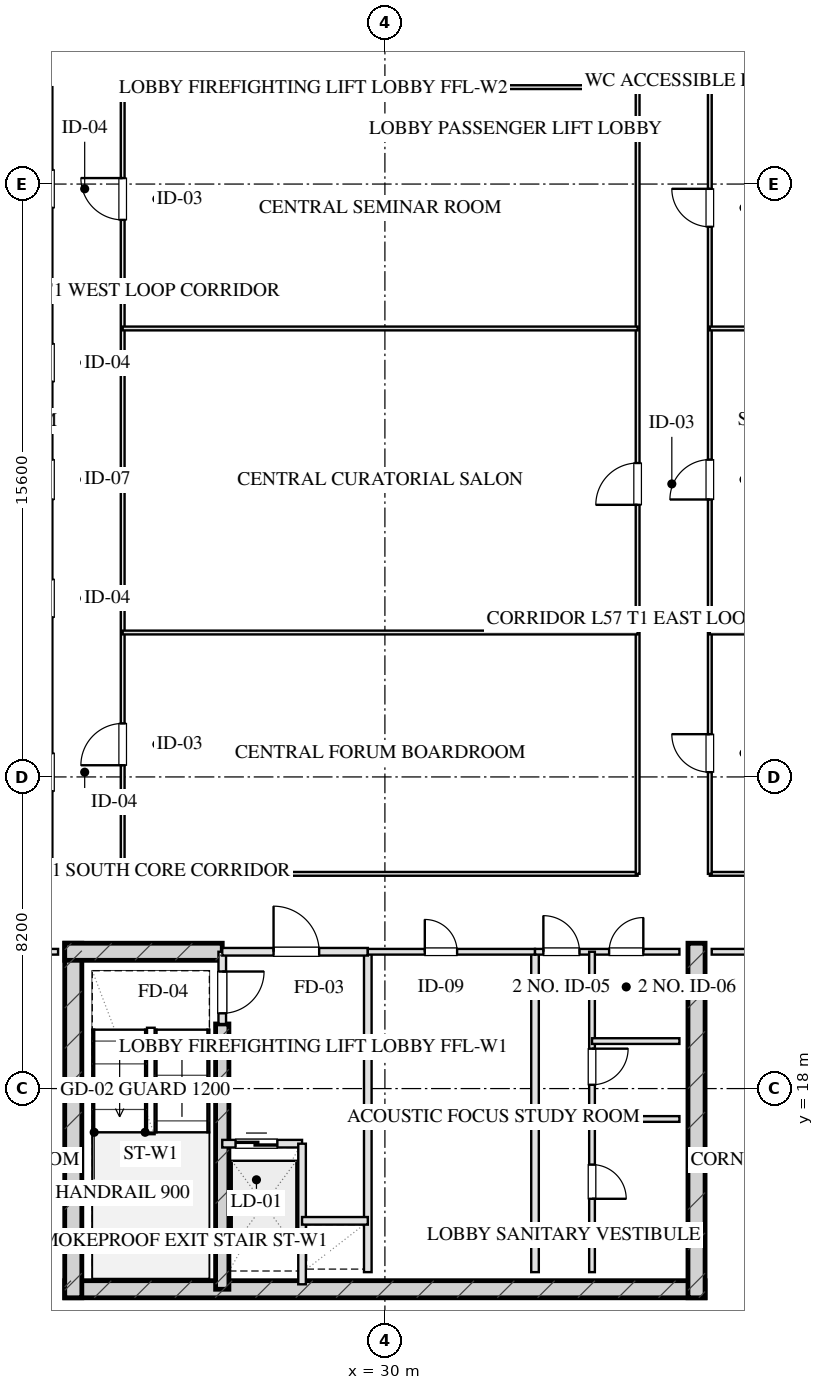
"""IFC4 building model, lengths in metres.
Left out: names, types, materials, properties, quantities, classifications, styles, units other than length and angle.
Written with IfcOpenShell. Run it as: python <this file> out.ifc"""

import sys

from ifc_helpers import new_model, si_unit, direction, frame, frame_2d, origin, place, context, subcontext, project, spatial, rectangle, extrude, element, fill, save


model = new_model("IFC4")
c1 = context("Model", 3, precision=1e-05, world=origin(), true_north=direction((0.0, 1.0)))
c2 = subcontext(c1, "Body", "Model", "MODEL_VIEW")
j1 = project(units=[si_unit("LENGTHUNIT", "METRE"), si_unit("PLANEANGLEUNIT", "RADIAN")], contexts=[c1])
p1 = place(None, origin())
s1 = spatial("IfcSite", under=j1, at=p1, CompositionType="ELEMENT")
p2 = place(p1, origin())
s2 = spatial("IfcBuilding", under=s1, at=p2, CompositionType="ELEMENT")
p3 = place(p2, frame((0.0, 0.0, 212.75)))
s3 = spatial("IfcBuildingStorey", under=s2, at=p3, CompositionType="ELEMENT", Elevation=212.75)
p4 = place(p3, frame((21.575, 12.72, 0.0), z_axis=(0.0, 0.0, 1.0), x_axis=(1.0, 0.0, 0.0)))
e1 = element("IfcWall", 1, at=p4, inside=s3, PredefinedType="SHEAR", context=c2, shape_type="SweptSolid", body=[
    extrude(rectangle(XDim=16.85, YDim=0.45, at=frame_2d((8.425, 0.0))), origin(), (0.0, 0.0, 1.0), 3.45),
])
for number, where, z_axis, x_axis in (
    (2, (21.8, 21.825, 0.0), (0.0, 0.0, 1.0), (0.0, -1.0, 0.0)),
    (3, (38.2, 21.825, 0.0), (0.0, 0.0, 1.0), (0.0, -1.0, 0.0)),
):
    element("IfcWall", number, at=place(p3, frame(where, z_axis=z_axis, x_axis=x_axis)), inside=s3, PredefinedType="SHEAR", context=c2, shape_type="SweptSolid", body=[
        extrude(rectangle(XDim=9.33, YDim=0.45, at=frame_2d((4.665, 0.0))), origin(), (0.0, 0.0, 1.0), 3.45),
    ])
p5 = place(p3, frame((25.72, 19.7, 0.0), z_axis=(0.0, 0.0, 1.0), x_axis=(0.0, -1.0, 0.0)))
e4 = element("IfcWall", 4, at=p5, inside=s3, PredefinedType="SHEAR", context=c2, shape_type="SweptSolid", body=[
    extrude(rectangle(XDim=6.98, YDim=0.35, at=frame_2d((3.49, 0.0))), origin(), (0.0, 0.0, 1.0), 3.45),
])
p6 = place(p3, frame((21.575, 21.6, 0.0), z_axis=(0.0, 0.0, 1.0), x_axis=(1.0, 0.0, 0.0)))
e5 = element("IfcWall", 5, at=p6, inside=s3, PredefinedType="SHEAR", context=c2, shape_type="SweptSolid", body=[
    extrude(rectangle(XDim=4.145, YDim=0.45, at=frame_2d((2.073, 0.0))), origin(), (0.0, 0.0, 1.0), 3.45),
])
p7 = place(p3, frame((25.72, 21.6, 0.0), z_axis=(0.0, 0.0, 1.0), x_axis=(0.0, -1.0, 0.0)))
e6 = element("IfcWall", 6, at=p7, inside=s3, PredefinedType="PARTITIONING", context=c2, shape_type="SweptSolid", body=[
    extrude(rectangle(XDim=1.9, YDim=0.2, at=frame_2d((0.95, 0.0))), origin(), (0.0, 0.0, 1.0), 3.155),
])
p8 = place(p7, frame((0.52, 0.0, 0.0)))
e7 = element("IfcOpeningElement", 7, at=p8, cuts=e6, PredefinedType="OPENING", context=c2, shape_type="SweptSolid", body=[
    extrude(rectangle(XDim=1.1, YDim=2.05, at=frame_2d((0.55, 1.025))), frame((0.0, 0.11, 0.0), z_axis=(0.0, -1.0, 0.0), x_axis=(1.0, 0.0, 0.0)), (0.0, 0.0, 1.0), 0.22),
])
p9 = place(p3, frame((29.55, 21.6, 0.0), z_axis=(0.0, 0.0, 1.0), x_axis=(0.0, -1.0, 0.0)))
e8 = element("IfcWall", 8, at=p9, inside=s3, PredefinedType="PARTITIONING", context=c2, shape_type="SweptSolid", body=[
    extrude(rectangle(XDim=8.43, YDim=0.2, at=frame_2d((4.215, 0.0))), origin(), (0.0, 0.0, 1.0), 3.155),
])
p10 = place(p3, frame((25.72, 21.6, 0.0), z_axis=(0.0, 0.0, 1.0), x_axis=(1.0, 0.0, 0.0)))
e9 = element("IfcWall", 9, at=p10, inside=s3, PredefinedType="PARTITIONING", context=c2, shape_type="SweptSolid", body=[
    extrude(rectangle(XDim=3.83, YDim=0.2, at=frame_2d((1.915, 0.0))), origin(), (0.0, 0.0, 1.0), 3.155),
])
p11 = place(p10, frame((1.35, 0.0, 0.0)))
e10 = element("IfcOpeningElement", 10, at=p11, cuts=e9, PredefinedType="OPENING", context=c2, shape_type="SweptSolid", body=[
    extrude(rectangle(XDim=1.2, YDim=2.05, at=frame_2d((0.6, 1.025))), frame((0.0, 0.11, 0.0), z_axis=(0.0, -1.0, 0.0), x_axis=(1.0, 0.0, 0.0)), (0.0, 0.0, 1.0), 0.22),
])
p12 = place(p3, frame((25.72, 16.55, 0.0), z_axis=(0.0, 0.0, 1.0), x_axis=(1.0, 0.0, 0.0)))
e11 = element("IfcWall", 11, at=p12, inside=s3, PredefinedType="PARTITIONING", context=c2, shape_type="SweptSolid", body=[
    extrude(rectangle(XDim=2.1, YDim=0.2, at=frame_2d((1.05, 0.0))), origin(), (0.0, 0.0, 1.0), 3.155),
])
p13 = place(p12, frame((0.35, 0.0, 0.0)))
e12 = element("IfcOpeningElement", 12, at=p13, cuts=e11, PredefinedType="OPENING", context=c2, shape_type="SweptSolid", body=[
    extrude(rectangle(XDim=1.1, YDim=2.05, at=frame_2d((0.55, 1.025))), frame((0.0, 0.11, 0.0), z_axis=(0.0, -1.0, 0.0), x_axis=(1.0, 0.0, 0.0)), (0.0, 0.0, 1.0), 0.22),
])
p14 = place(p3, frame((27.82, 16.55, 0.0), z_axis=(0.0, 0.0, 1.0), x_axis=(0.0, -1.0, 0.0)))
e13 = element("IfcWall", 13, at=p14, inside=s3, PredefinedType="PARTITIONING", context=c2, shape_type="SweptSolid", body=[
    extrude(rectangle(XDim=3.7, YDim=0.2, at=frame_2d((1.85, 0.0))), origin(), (0.0, 0.0, 1.0), 3.155),
])
p15 = place(p3, frame((27.82, 14.52, 0.0), z_axis=(0.0, 0.0, 1.0), x_axis=(1.0, 0.0, 0.0)))
e14 = element("IfcWall", 14, at=p15, inside=s3, PredefinedType="PARTITIONING", context=c2, shape_type="SweptSolid", body=[
    extrude(rectangle(XDim=1.73, YDim=0.2, at=frame_2d((0.865, 0.0))), origin(), (0.0, 0.0, 1.0), 3.155),
])
p16 = place(p3, frame((33.95, 21.6, 0.0), z_axis=(0.0, 0.0, 1.0), x_axis=(0.0, -1.0, 0.0)))
e15 = element("IfcWall", 15, at=p16, inside=s3, PredefinedType="PARTITIONING", context=c2, shape_type="SweptSolid", body=[
    extrude(rectangle(XDim=8.43, YDim=0.2, at=frame_2d((4.215, 0.0))), origin(), (0.0, 0.0, 1.0), 3.155),
])
p17 = place(p3, frame((29.55, 21.6, 0.0), z_axis=(0.0, 0.0, 1.0), x_axis=(1.0, 0.0, 0.0)))
e16 = element("IfcWall", 16, at=p17, inside=s3, PredefinedType="PARTITIONING", context=c2, shape_type="SweptSolid", body=[
    extrude(rectangle(XDim=4.4, YDim=0.15, at=frame_2d((2.2, 0.0))), origin(), (0.0, 0.0, 1.0), 3.155),
])
p18 = place(p17, frame((1.5, 0.0, 0.0)))
e17 = element("IfcOpeningElement", 17, at=p18, cuts=e16, PredefinedType="OPENING", context=c2, shape_type="SweptSolid", body=[
    extrude(rectangle(XDim=0.85, YDim=2.05, at=frame_2d((0.425, 1.025))), frame((0.0, 0.085, 0.0), z_axis=(0.0, -1.0, 0.0), x_axis=(1.0, 0.0, 0.0)), (0.0, 0.0, 1.0), 0.17),
])
p19 = place(p3, frame((29.55, 17.3, 0.0), z_axis=(0.0, 0.0, 1.0), x_axis=(1.0, 0.0, 0.0)))
e18 = element("IfcWall", 18, at=p19, inside=s3, PredefinedType="PARTITIONING", context=c2, shape_type="SweptSolid", body=[
    extrude(rectangle(XDim=4.4, YDim=0.15, at=frame_2d((2.2, 0.0))), origin(), (0.0, 0.0, 1.0), 3.155),
])
p20 = place(p3, frame((33.95, 21.6, 0.0), z_axis=(0.0, 0.0, 1.0), x_axis=(1.0, 0.0, 0.0)))
e19 = element("IfcWall", 19, at=p20, inside=s3, PredefinedType="PARTITIONING", context=c2, shape_type="SweptSolid", body=[
    extrude(rectangle(XDim=3.8, YDim=0.15, at=frame_2d((1.9, 0.0))), origin(), (0.0, 0.0, 1.0), 3.155),
])
p21 = place(p20, frame((0.22, 0.0, 0.0)))
e20 = element("IfcOpeningElement", 20, at=p21, cuts=e19, PredefinedType="OPENING", context=c2, shape_type="SweptSolid", body=[
    extrude(rectangle(XDim=0.95, YDim=2.05, at=frame_2d((0.475, 1.025))), frame((0.0, 0.085, 0.0), z_axis=(0.0, -1.0, 0.0), x_axis=(1.0, 0.0, 0.0)), (0.0, 0.0, 1.0), 0.17),
])
p22 = place(p20, frame((1.95, 0.0, 0.0)))
e21 = element("IfcOpeningElement", 21, at=p22, cuts=e19, PredefinedType="OPENING", context=c2, shape_type="SweptSolid", body=[
    extrude(rectangle(XDim=0.9, YDim=2.05, at=frame_2d((0.45, 1.025))), frame((0.0, 0.085, 0.0), z_axis=(0.0, -1.0, 0.0), x_axis=(1.0, 0.0, 0.0)), (0.0, 0.0, 1.0), 0.17),
])
p23 = place(p3, frame((35.45, 21.6, 0.0), z_axis=(0.0, 0.0, 1.0), x_axis=(0.0, -1.0, 0.0)))
e22 = element("IfcWall", 22, at=p23, inside=s3, PredefinedType="PARTITIONING", context=c2, shape_type="SweptSolid", body=[
    extrude(rectangle(XDim=8.43, YDim=0.15, at=frame_2d((4.215, 0.0))), origin(), (0.0, 0.0, 1.0), 2.795),
])
p24 = place(p23, frame((2.55, 0.0, 0.0)))
e23 = element("IfcOpeningElement", 23, at=p24, cuts=e22, PredefinedType="OPENING", context=c2, shape_type="SweptSolid", body=[
    extrude(rectangle(XDim=0.95, YDim=2.05, at=frame_2d((0.475, 1.025))), frame((0.0, 0.085, 0.0), z_axis=(0.0, -1.0, 0.0), x_axis=(1.0, 0.0, 0.0)), (0.0, 0.0, 1.0), 0.17),
])
p25 = place(p23, frame((5.6, 0.0, 0.0)))
e24 = element("IfcOpeningElement", 24, at=p25, cuts=e22, PredefinedType="OPENING", context=c2, shape_type="SweptSolid", body=[
    extrude(rectangle(XDim=0.9, YDim=2.05, at=frame_2d((0.45, 1.025))), frame((0.0, 0.085, 0.0), z_axis=(0.0, -1.0, 0.0), x_axis=(1.0, 0.0, 0.0)), (0.0, 0.0, 1.0), 0.17),
])
for number, where, z_axis, x_axis in (
    (25, (35.45, 17.2, 0.0), (0.0, 0.0, 1.0), (1.0, 0.0, 0.0)),
    (26, (35.45, 19.25, 0.0), (0.0, 0.0, 1.0), (1.0, 0.0, 0.0)),
):
    element("IfcWall", number, at=place(p3, frame(where, z_axis=z_axis, x_axis=x_axis)), inside=s3, PredefinedType="PARTITIONING", context=c2, shape_type="SweptSolid", body=[
        extrude(rectangle(XDim=2.3, YDim=0.15, at=frame_2d((1.15, 0.0))), origin(), (0.0, 0.0, 1.0), 3.155),
    ])
p26 = place(p3, frame((13.2, 21.6, 0.0), z_axis=(0.0, 0.0, 1.0), x_axis=(1.0, 0.0, 0.0)))
e27 = element("IfcWall", 27, at=p26, inside=s3, PredefinedType="PARTITIONING", context=c2, shape_type="SweptSolid", body=[
    extrude(rectangle(XDim=8.2, YDim=0.15, at=frame_2d((4.1, 0.0))), origin(), (0.0, 0.0, 1.0), 3.155),
])
p27 = place(p26, frame((3.444, 0.0, 0.0)))
e28 = element("IfcOpeningElement", 28, at=p27, cuts=e27, PredefinedType="OPENING", context=c2, shape_type="SweptSolid", body=[
    extrude(rectangle(XDim=1.0, YDim=2.05, at=frame_2d((0.5, 1.025))), frame((0.0, 0.085, 0.0), z_axis=(0.0, -1.0, 0.0), x_axis=(1.0, 0.0, 0.0)), (0.0, 0.0, 1.0), 0.17),
])
p28 = place(p3, frame((38.6, 21.6, 0.0), z_axis=(0.0, 0.0, 1.0), x_axis=(1.0, 0.0, 0.0)))
e29 = element("IfcWall", 29, at=p28, inside=s3, PredefinedType="PARTITIONING", context=c2, shape_type="SweptSolid", body=[
    extrude(rectangle(XDim=8.2, YDim=0.15, at=frame_2d((4.1, 0.0))), origin(), (0.0, 0.0, 1.0), 3.155),
])
p29 = place(p28, frame((3.444, 0.0, 0.0)))
e30 = element("IfcOpeningElement", 30, at=p29, cuts=e29, PredefinedType="OPENING", context=c2, shape_type="SweptSolid", body=[
    extrude(rectangle(XDim=1.0, YDim=2.05, at=frame_2d((0.5, 1.025))), frame((0.0, 0.085, 0.0), z_axis=(0.0, -1.0, 0.0), x_axis=(1.0, 0.0, 0.0)), (0.0, 0.0, 1.0), 0.17),
])
p30 = place(p3, frame((23.1, 23.65, 0.0), z_axis=(0.0, 0.0, 1.0), x_axis=(1.0, 0.0, 0.0)))
e31 = element("IfcWall", 31, at=p30, inside=s3, PredefinedType="MOVABLE", context=c2, shape_type="SweptSolid", body=[
    extrude(rectangle(XDim=13.55, YDim=0.1, at=frame_2d((6.775, 0.0))), origin(), (0.0, 0.0, 1.0), 3.155),
])
p31 = place(p3, frame((38.55, 23.65, 0.0), z_axis=(0.0, 0.0, 1.0), x_axis=(1.0, 0.0, 0.0)))
e32 = element("IfcWall", 32, at=p31, inside=s3, PredefinedType="MOVABLE", context=c2, shape_type="SweptSolid", body=[
    extrude(rectangle(XDim=8.25, YDim=0.1, at=frame_2d((4.125, 0.0))), origin(), (0.0, 0.0, 1.0), 3.155),
])
p32 = place(p3, frame((23.1, 44.35, 0.0), z_axis=(0.0, 0.0, 1.0), x_axis=(1.0, 0.0, 0.0)))
e33 = element("IfcWall", 33, at=p32, inside=s3, PredefinedType="MOVABLE", context=c2, shape_type="SweptSolid", body=[
    extrude(rectangle(XDim=13.55, YDim=0.1, at=frame_2d((6.775, 0.0))), origin(), (0.0, 0.0, 1.0), 3.155),
])
p33 = place(p3, frame((38.55, 44.35, 0.0), z_axis=(0.0, 0.0, 1.0), x_axis=(1.0, 0.0, 0.0)))
e34 = element("IfcWall", 34, at=p33, inside=s3, PredefinedType="MOVABLE", context=c2, shape_type="SweptSolid", body=[
    extrude(rectangle(XDim=8.25, YDim=0.1, at=frame_2d((4.125, 0.0))), origin(), (0.0, 0.0, 1.0), 3.155),
])
p34 = place(p3, frame((23.1, 23.65, 0.0), z_axis=(0.0, 0.0, 1.0), x_axis=(0.0, 1.0, 0.0)))
e35 = element("IfcWall", 35, at=p34, inside=s3, PredefinedType="MOVABLE", context=c2, shape_type="SweptSolid", body=[
    extrude(rectangle(XDim=20.7, YDim=0.1, at=frame_2d((10.35, 0.0))), origin(), (0.0, 0.0, 1.0), 3.155),
])
p35 = place(p34, frame((2.857, 0.0, 0.0)))
e36 = element("IfcOpeningElement", 36, at=p35, cuts=e35, PredefinedType="OPENING", context=c2, shape_type="SweptSolid", body=[
    extrude(rectangle(XDim=1.1, YDim=2.05, at=frame_2d((0.55, 1.025))), frame((0.0, 0.06, 0.0), z_axis=(0.0, -1.0, 0.0), x_axis=(1.0, 0.0, 0.0)), (0.0, 0.0, 1.0), 0.12),
])
p36 = place(p34, frame((17.208, 0.0, 0.0)))
e37 = element("IfcOpeningElement", 37, at=p36, cuts=e35, PredefinedType="OPENING", context=c2, shape_type="SweptSolid", body=[
    extrude(rectangle(XDim=1.1, YDim=2.05, at=frame_2d((0.55, 1.025))), frame((0.0, 0.06, 0.0), z_axis=(0.0, -1.0, 0.0), x_axis=(1.0, 0.0, 0.0)), (0.0, 0.0, 1.0), 0.12),
])
p37 = place(p3, frame((36.65, 23.65, 0.0), z_axis=(0.0, 0.0, 1.0), x_axis=(0.0, 1.0, 0.0)))
e38 = element("IfcWall", 38, at=p37, inside=s3, PredefinedType="MOVABLE", context=c2, shape_type="SweptSolid", body=[
    extrude(rectangle(XDim=20.7, YDim=0.1, at=frame_2d((10.35, 0.0))), origin(), (0.0, 0.0, 1.0), 3.155),
])
p38 = place(p37, frame((9.71, 0.0, 0.0)))
e39 = element("IfcOpeningElement", 39, at=p38, cuts=e38, PredefinedType="OPENING", context=c2, shape_type="SweptSolid", body=[
    extrude(rectangle(XDim=1.1, YDim=2.05, at=frame_2d((0.55, 1.025))), frame((0.0, 0.06, 0.0), z_axis=(0.0, -1.0, 0.0), x_axis=(1.0, 0.0, 0.0)), (0.0, 0.0, 1.0), 0.12),
])
p39 = place(p3, frame((38.55, 23.65, 0.0), z_axis=(0.0, 0.0, 1.0), x_axis=(0.0, 1.0, 0.0)))
e40 = element("IfcWall", 40, at=p39, inside=s3, PredefinedType="MOVABLE", context=c2, shape_type="SweptSolid", body=[
    extrude(rectangle(XDim=20.7, YDim=0.1, at=frame_2d((10.35, 0.0))), origin(), (0.0, 0.0, 1.0), 3.155),
])
p40 = place(p39, frame((2.675, 0.0, 0.0)))
e41 = element("IfcOpeningElement", 41, at=p40, cuts=e40, PredefinedType="OPENING", context=c2, shape_type="SweptSolid", body=[
    extrude(rectangle(XDim=1.0, YDim=2.05, at=frame_2d((0.5, 1.025))), frame((0.0, 0.06, 0.0), z_axis=(0.0, -1.0, 0.0), x_axis=(1.0, 0.0, 0.0)), (0.0, 0.0, 1.0), 0.12),
])
p41 = place(p39, frame((9.85, 0.0, 0.0)))
e42 = element("IfcOpeningElement", 42, at=p41, cuts=e40, PredefinedType="OPENING", context=c2, shape_type="SweptSolid", body=[
    extrude(rectangle(XDim=1.05, YDim=2.05, at=frame_2d((0.525, 1.025))), frame((0.0, 0.06, 0.0), z_axis=(0.0, -1.0, 0.0), x_axis=(1.0, 0.0, 0.0)), (0.0, 0.0, 1.0), 0.12),
])
p42 = place(p39, frame((17.025, 0.0, 0.0)))
e43 = element("IfcOpeningElement", 43, at=p42, cuts=e40, PredefinedType="OPENING", context=c2, shape_type="SweptSolid", body=[
    extrude(rectangle(XDim=1.0, YDim=2.05, at=frame_2d((0.5, 1.025))), frame((0.0, 0.06, 0.0), z_axis=(0.0, -1.0, 0.0), x_axis=(1.0, 0.0, 0.0)), (0.0, 0.0, 1.0), 0.12),
])
for number, where, z_axis, x_axis in (
    (44, (23.1, 30.0, 0.0), (0.0, 0.0, 1.0), (1.0, 0.0, 0.0)),
    (45, (23.1, 38.0, 0.0), (0.0, 0.0, 1.0), (1.0, 0.0, 0.0)),
):
    element("IfcWall", number, at=place(p3, frame(where, z_axis=z_axis, x_axis=x_axis)), inside=s3, PredefinedType="MOVABLE", context=c2, shape_type="SweptSolid", body=[
        extrude(rectangle(XDim=13.55, YDim=0.1, at=frame_2d((6.775, 0.0))), origin(), (0.0, 0.0, 1.0), 3.155),
    ])
for number, where, z_axis, x_axis in (
    (46, (38.55, 30.0, 0.0), (0.0, 0.0, 1.0), (1.0, 0.0, 0.0)),
    (47, (38.55, 38.0, 0.0), (0.0, 0.0, 1.0), (1.0, 0.0, 0.0)),
):
    element("IfcWall", number, at=place(p3, frame(where, z_axis=z_axis, x_axis=x_axis)), inside=s3, PredefinedType="MOVABLE", context=c2, shape_type="SweptSolid", body=[
        extrude(rectangle(XDim=8.25, YDim=0.1, at=frame_2d((4.125, 0.0))), origin(), (0.0, 0.0, 1.0), 3.155),
    ])
p43 = place(p8, origin())
e48 = element("IfcDoor", 48, at=p43, inside=s3, OperationType="SINGLE_SWING_LEFT", PredefinedType="DOOR", context=c2, shape_type="SweptSolid", body=[
    extrude(rectangle(XDim=1.1, YDim=2.05, at=frame_2d((0.55, 1.025))), frame((0.0, 0.025, 0.0), z_axis=(0.0, -1.0, 0.0), x_axis=(1.0, 0.0, 0.0)), (0.0, 0.0, 1.0), 0.05),
])
fill(e7, e48)
p44 = place(p11, origin())
e49 = element("IfcDoor", 49, at=p44, inside=s3, OperationType="SINGLE_SWING_LEFT", PredefinedType="DOOR", context=c2, shape_type="SweptSolid", body=[
    extrude(rectangle(XDim=1.2, YDim=2.05, at=frame_2d((0.6, 1.025))), frame((0.0, 0.025, 0.0), z_axis=(0.0, -1.0, 0.0), x_axis=(1.0, 0.0, 0.0)), (0.0, 0.0, 1.0), 0.05),
])
fill(e10, e49)
p45 = place(p13, origin())
e50 = element("IfcDoor", 50, at=p45, inside=s3, OperationType="DOUBLE_DOOR_SLIDING", PredefinedType="DOOR", context=c2, shape_type="SweptSolid", body=[
    extrude(rectangle(XDim=1.1, YDim=2.05, at=frame_2d((0.55, 1.025))), frame((0.0, 0.025, 0.0), z_axis=(0.0, -1.0, 0.0), x_axis=(1.0, 0.0, 0.0)), (0.0, 0.0, 1.0), 0.05),
])
fill(e12, e50)
p46 = place(p18, origin())
e51 = element("IfcDoor", 51, at=p46, inside=s3, OperationType="SINGLE_SWING_LEFT", PredefinedType="DOOR", context=c2, shape_type="SweptSolid", body=[
    extrude(rectangle(XDim=0.85, YDim=2.05, at=frame_2d((0.425, 1.025))), frame((0.0, 0.025, 0.0), z_axis=(0.0, -1.0, 0.0), x_axis=(1.0, 0.0, 0.0)), (0.0, 0.0, 1.0), 0.05),
])
fill(e17, e51)
p47 = place(p21, origin())
e52 = element("IfcDoor", 52, at=p47, inside=s3, OperationType="SINGLE_SWING_LEFT", PredefinedType="DOOR", context=c2, shape_type="SweptSolid", body=[
    extrude(rectangle(XDim=0.95, YDim=2.05, at=frame_2d((0.475, 1.025))), frame((0.0, 0.025, 0.0), z_axis=(0.0, -1.0, 0.0), x_axis=(1.0, 0.0, 0.0)), (0.0, 0.0, 1.0), 0.05),
])
fill(e20, e52)
p48 = place(p22, origin())
e53 = element("IfcDoor", 53, at=p48, inside=s3, OperationType="SINGLE_SWING_RIGHT", PredefinedType="DOOR", context=c2, shape_type="SweptSolid", body=[
    extrude(rectangle(XDim=0.9, YDim=2.05, at=frame_2d((0.45, 1.025))), frame((0.0, 0.025, 0.0), z_axis=(0.0, -1.0, 0.0), x_axis=(1.0, 0.0, 0.0)), (0.0, 0.0, 1.0), 0.05),
])
fill(e21, e53)
p49 = place(p24, origin())
e54 = element("IfcDoor", 54, at=p49, inside=s3, OperationType="SINGLE_SWING_LEFT", PredefinedType="DOOR", context=c2, shape_type="SweptSolid", body=[
    extrude(rectangle(XDim=0.95, YDim=2.05, at=frame_2d((0.475, 1.025))), frame((0.0, 0.025, 0.0), z_axis=(0.0, -1.0, 0.0), x_axis=(1.0, 0.0, 0.0)), (0.0, 0.0, 1.0), 0.05),
])
fill(e23, e54)
p50 = place(p25, origin())
e55 = element("IfcDoor", 55, at=p50, inside=s3, OperationType="SINGLE_SWING_RIGHT", PredefinedType="DOOR", context=c2, shape_type="SweptSolid", body=[
    extrude(rectangle(XDim=0.9, YDim=2.05, at=frame_2d((0.45, 1.025))), frame((0.0, 0.025, 0.0), z_axis=(0.0, -1.0, 0.0), x_axis=(1.0, 0.0, 0.0)), (0.0, 0.0, 1.0), 0.05),
])
fill(e24, e55)
p51 = place(p35, origin())
e56 = element("IfcDoor", 56, at=p51, inside=s3, OperationType="SINGLE_SWING_LEFT", PredefinedType="DOOR", context=c2, shape_type="SweptSolid", body=[
    extrude(rectangle(XDim=1.1, YDim=2.05, at=frame_2d((0.55, 1.025))), frame((0.0, 0.025, 0.0), z_axis=(0.0, -1.0, 0.0), x_axis=(1.0, 0.0, 0.0)), (0.0, 0.0, 1.0), 0.05),
])
fill(e36, e56)
p52 = place(p36, origin())
e57 = element("IfcDoor", 57, at=p52, inside=s3, OperationType="SINGLE_SWING_RIGHT", PredefinedType="DOOR", context=c2, shape_type="SweptSolid", body=[
    extrude(rectangle(XDim=1.1, YDim=2.05, at=frame_2d((0.55, 1.025))), frame((0.0, 0.025, 0.0), z_axis=(0.0, -1.0, 0.0), x_axis=(1.0, 0.0, 0.0)), (0.0, 0.0, 1.0), 0.05),
])
fill(e37, e57)
p53 = place(p38, origin())
e58 = element("IfcDoor", 58, at=p53, inside=s3, OperationType="SINGLE_SWING_LEFT", PredefinedType="DOOR", context=c2, shape_type="SweptSolid", body=[
    extrude(rectangle(XDim=1.1, YDim=2.05, at=frame_2d((0.55, 1.025))), frame((0.0, 0.025, 0.0), z_axis=(0.0, -1.0, 0.0), x_axis=(1.0, 0.0, 0.0)), (0.0, 0.0, 1.0), 0.05),
])
fill(e39, e58)
p54 = place(p40, origin())
e59 = element("IfcDoor", 59, at=p54, inside=s3, OperationType="SINGLE_SWING_RIGHT", PredefinedType="DOOR", context=c2, shape_type="SweptSolid", body=[
    extrude(rectangle(XDim=1.0, YDim=2.05, at=frame_2d((0.5, 1.025))), frame((0.0, 0.025, 0.0), z_axis=(0.0, -1.0, 0.0), x_axis=(1.0, 0.0, 0.0)), (0.0, 0.0, 1.0), 0.05),
])
fill(e41, e59)
p55 = place(p41, origin())
e60 = element("IfcDoor", 60, at=p55, inside=s3, OperationType="SINGLE_SWING_LEFT", PredefinedType="DOOR", context=c2, shape_type="SweptSolid", body=[
    extrude(rectangle(XDim=1.05, YDim=2.05, at=frame_2d((0.525, 1.025))), frame((0.0, 0.025, 0.0), z_axis=(0.0, -1.0, 0.0), x_axis=(1.0, 0.0, 0.0)), (0.0, 0.0, 1.0), 0.05),
])
fill(e42, e60)
p56 = place(p42, origin())
e61 = element("IfcDoor", 61, at=p56, inside=s3, OperationType="SINGLE_SWING_RIGHT", PredefinedType="DOOR", context=c2, shape_type="SweptSolid", body=[
    extrude(rectangle(XDim=1.0, YDim=2.05, at=frame_2d((0.5, 1.025))), frame((0.0, 0.025, 0.0), z_axis=(0.0, -1.0, 0.0), x_axis=(1.0, 0.0, 0.0)), (0.0, 0.0, 1.0), 0.05),
])
fill(e43, e61)
save(model, sys.argv[1])
